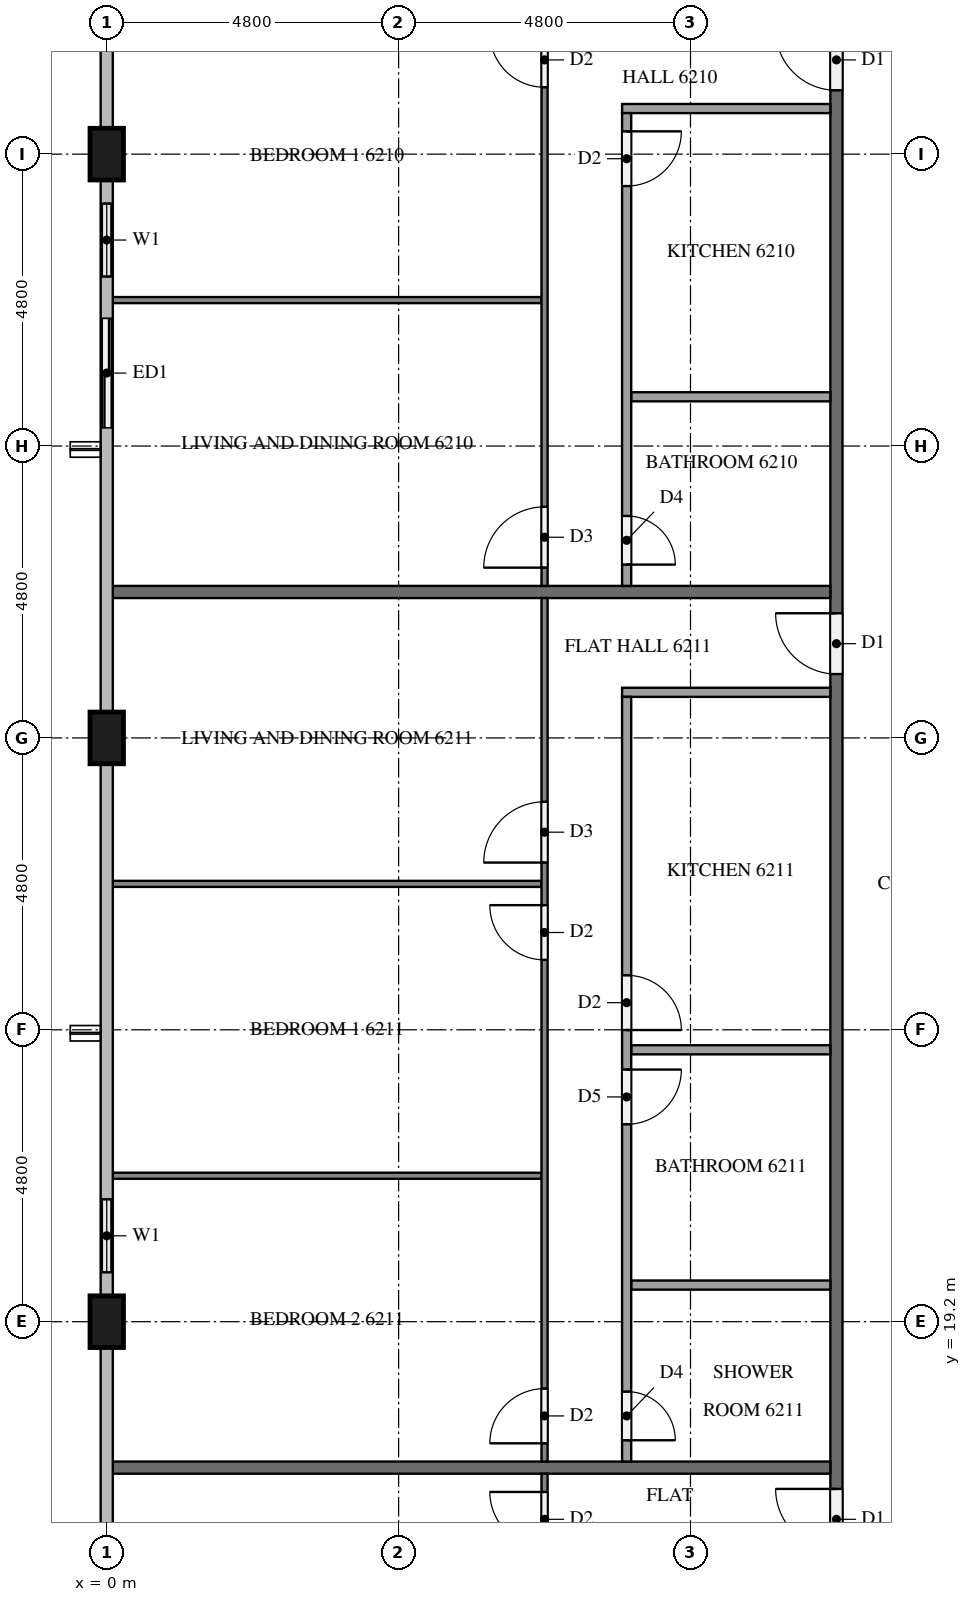
"""IFC4 building model, lengths in metres.
Left out: names, types, materials, properties, quantities, classifications, styles, units other than length and angle.
Written with IfcOpenShell. Run it as: python <this file> out.ifc"""

import sys

from ifc_helpers import new_model, si_unit, direction, frame, frame_2d, origin, origin_2d, place, context, subcontext, project, spatial, rectangle, extrude, element, fill, save


model = new_model("IFC4")
c1 = context("Model", 3, precision=1e-05, world=origin(), true_north=direction((0.0, 1.0)))
c2 = subcontext(c1, "Body", "Model", "MODEL_VIEW")
j1 = project(units=[si_unit("LENGTHUNIT", "METRE"), si_unit("PLANEANGLEUNIT", "RADIAN")], contexts=[c1])
p1 = place(None, origin())
s1 = spatial("IfcSite", under=j1, at=p1, CompositionType="ELEMENT")
p2 = place(p1, origin())
s2 = spatial("IfcBuilding", under=s1, at=p2, CompositionType="ELEMENT")
p3 = place(p2, frame((0.0, 0.0, 238.7)))
s3 = spatial("IfcBuildingStorey", under=s2, at=p3, CompositionType="ELEMENT", Elevation=238.7)
for number, where, z_axis, x_axis in (
    (1, (0.0, 38.4, 0.0), (0.0, 0.0, 1.0), (0.0, 1.0, 0.0)),
    (2, (0.0, 28.8, 0.0), (0.0, 0.0, 1.0), (0.0, 1.0, 0.0)),
    (3, (0.0, 19.2, 0.0), (0.0, 0.0, 1.0), (0.0, 1.0, 0.0)),
):
    element("IfcColumn", number, at=place(p3, frame(where, z_axis=z_axis, x_axis=x_axis)), inside=s3, PredefinedType="COLUMN", context=c2, shape_type="SweptSolid", body=[
        extrude(rectangle(XDim=0.85, YDim=0.55, at=origin_2d()), origin(), (0.0, 0.0, 1.0), 3.2),
    ])
p4 = place(p3, frame((0.0, 37.975, 0.0), z_axis=(0.0, 0.0, 1.0), x_axis=(0.0, -1.0, 0.0)))
e4 = element("IfcWall", 4, at=p4, inside=s3, PredefinedType="SOLIDWALL", context=c2, shape_type="SweptSolid", body=[
    extrude(rectangle(XDim=4.375, YDim=0.15, at=frame_2d((2.188, 0.0))), origin(), (0.0, 0.0, 1.0), 3.2),
])
p5 = place(p4, frame((0.387, 0.0, 0.9)))
e5 = element("IfcOpeningElement", 5, at=p5, cuts=e4, PredefinedType="OPENING", context=c2, shape_type="SweptSolid", body=[
    extrude(rectangle(XDim=1.2, YDim=1.4, at=frame_2d((0.6, 0.7))), frame((0.0, 0.085, 0.0), z_axis=(0.0, -1.0, 0.0), x_axis=(1.0, 0.0, 0.0)), (0.0, 0.0, 1.0), 0.17),
])
p6 = place(p4, frame((2.275, 0.0, 0.0)))
e6 = element("IfcOpeningElement", 6, at=p6, cuts=e4, PredefinedType="OPENING", context=c2, shape_type="SweptSolid", body=[
    extrude(rectangle(XDim=1.8, YDim=2.4, at=frame_2d((0.9, 1.2))), frame((0.0, 0.085, 0.0), z_axis=(0.0, -1.0, 0.0), x_axis=(1.0, 0.0, 0.0)), (0.0, 0.0, 1.0), 0.17),
])
p7 = place(p3, frame((0.0, 21.6, 0.0), z_axis=(0.0, 0.0, 1.0), x_axis=(0.0, -1.0, 0.0)))
e7 = element("IfcWall", 7, at=p7, inside=s3, PredefinedType="SOLIDWALL", context=c2, shape_type="SweptSolid", body=[
    extrude(rectangle(XDim=1.975, YDim=0.15, at=frame_2d((0.988, 0.0))), origin(), (0.0, 0.0, 1.0), 3.2),
])
p8 = place(p7, frame((0.387, 0.0, 0.9)))
e8 = element("IfcOpeningElement", 8, at=p8, cuts=e7, PredefinedType="OPENING", context=c2, shape_type="SweptSolid", body=[
    extrude(rectangle(XDim=1.2, YDim=1.4, at=frame_2d((0.6, 0.7))), frame((0.0, 0.085, 0.0), z_axis=(0.0, -1.0, 0.0), x_axis=(1.0, 0.0, 0.0)), (0.0, 0.0, 1.0), 0.17),
])
p9 = place(p3, frame((12.0, 12.1, 0.0), z_axis=(0.0, 0.0, 1.0), x_axis=(0.0, 1.0, 0.0)))
e9 = element("IfcWall", 9, at=p9, inside=s3, PredefinedType="PARTITIONING", context=c2, shape_type="SweptSolid", body=[
    extrude(rectangle(XDim=28.6, YDim=0.2, at=frame_2d((14.3, 0.0))), origin(), (0.0, 0.0, 1.0), 3.2),
])
p10 = place(p9, frame((27.35, 0.0, 0.0)))
e10 = element("IfcOpeningElement", 10, at=p10, cuts=e9, PredefinedType="OPENING", context=c2, shape_type="SweptSolid", body=[
    extrude(rectangle(XDim=1.0, YDim=2.1, at=frame_2d((0.5, 1.05))), frame((0.0, 0.11, 0.0), z_axis=(0.0, -1.0, 0.0), x_axis=(1.0, 0.0, 0.0)), (0.0, 0.0, 1.0), 0.22),
])
p11 = place(p9, frame((17.75, 0.0, 0.0)))
e11 = element("IfcOpeningElement", 11, at=p11, cuts=e9, PredefinedType="OPENING", context=c2, shape_type="SweptSolid", body=[
    extrude(rectangle(XDim=1.0, YDim=2.1, at=frame_2d((0.5, 1.05))), frame((0.0, 0.11, 0.0), z_axis=(0.0, -1.0, 0.0), x_axis=(1.0, 0.0, 0.0)), (0.0, 0.0, 1.0), 0.22),
])
p12 = place(p9, frame((3.35, 0.0, 0.0)))
e12 = element("IfcOpeningElement", 12, at=p12, cuts=e9, PredefinedType="OPENING", context=c2, shape_type="SweptSolid", body=[
    extrude(rectangle(XDim=1.0, YDim=2.1, at=frame_2d((0.5, 1.05))), frame((0.0, 0.11, 0.0), z_axis=(0.0, -1.0, 0.0), x_axis=(1.0, 0.0, 0.0)), (0.0, 0.0, 1.0), 0.22),
])
for number, where, z_axis, x_axis in (
    (13, (0.1, 31.2, 0.0), (0.0, 0.0, 1.0), (1.0, 0.0, 0.0)),
    (14, (0.1, 16.8, 0.0), (0.0, 0.0, 1.0), (1.0, 0.0, 0.0)),
):
    element("IfcWall", number, at=place(p3, frame(where, z_axis=z_axis, x_axis=x_axis)), inside=s3, PredefinedType="PARTITIONING", context=c2, shape_type="SweptSolid", body=[
        extrude(rectangle(XDim=11.8, YDim=0.2, at=frame_2d((5.9, 0.0))), origin(), (0.0, 0.0, 1.0), 3.2),
    ])
p13 = place(p3, frame((7.15, 36.0, 0.0), z_axis=(0.0, 0.0, 1.0), x_axis=(-1.0, 0.0, 0.0)))
e15 = element("IfcWall", 15, at=p13, inside=s3, PredefinedType="PARTITIONING", context=c2, shape_type="SweptSolid", body=[
    extrude(rectangle(XDim=7.05, YDim=0.1, at=frame_2d((3.525, 0.0))), origin(), (0.0, 0.0, 1.0), 3.2),
])
p14 = place(p3, frame((7.2, 31.3, 0.0), z_axis=(0.0, 0.0, 1.0), x_axis=(0.0, 1.0, 0.0)))
e16 = element("IfcWall", 16, at=p14, inside=s3, PredefinedType="PARTITIONING", context=c2, shape_type="SweptSolid", body=[
    extrude(rectangle(XDim=9.4, YDim=0.1, at=frame_2d((4.7, 0.0))), origin(), (0.0, 0.0, 1.0), 3.2),
])
p15 = place(p14, frame((8.2, 0.0, 0.0)))
e17 = element("IfcOpeningElement", 17, at=p15, cuts=e16, PredefinedType="OPENING", context=c2, shape_type="SweptSolid", body=[
    extrude(rectangle(XDim=0.9, YDim=2.1, at=frame_2d((0.45, 1.05))), frame((0.0, 0.06, 0.0), z_axis=(0.0, -1.0, 0.0), x_axis=(1.0, 0.0, 0.0)), (0.0, 0.0, 1.0), 0.12),
])
p16 = place(p14, frame((0.3, 0.0, 0.0)))
e18 = element("IfcOpeningElement", 18, at=p16, cuts=e16, PredefinedType="OPENING", context=c2, shape_type="SweptSolid", body=[
    extrude(rectangle(XDim=1.0, YDim=2.1, at=frame_2d((0.5, 1.05))), frame((0.0, 0.06, 0.0), z_axis=(0.0, -1.0, 0.0), x_axis=(1.0, 0.0, 0.0)), (0.0, 0.0, 1.0), 0.12),
])
p17 = place(p3, frame((11.9, 34.41, 0.0), z_axis=(0.0, 0.0, 1.0), x_axis=(-1.0, 0.0, 0.0)))
e19 = element("IfcWall", 19, at=p17, inside=s3, PredefinedType="PARTITIONING", context=c2, shape_type="SweptSolid", body=[
    extrude(rectangle(XDim=3.275, YDim=0.15, at=frame_2d((1.637, 0.0))), origin(), (0.0, 0.0, 1.0), 3.2),
])
p18 = place(p3, frame((11.9, 39.15, 0.0), z_axis=(0.0, 0.0, 1.0), x_axis=(-1.0, 0.0, 0.0)))
e20 = element("IfcWall", 20, at=p18, inside=s3, PredefinedType="PARTITIONING", context=c2, shape_type="SweptSolid", body=[
    extrude(rectangle(XDim=3.425, YDim=0.15, at=frame_2d((1.712, 0.0))), origin(), (0.0, 0.0, 1.0), 3.2),
])
p19 = place(p3, frame((8.55, 39.075, 0.0), z_axis=(0.0, 0.0, 1.0), x_axis=(0.0, -1.0, 0.0)))
e21 = element("IfcWall", 21, at=p19, inside=s3, PredefinedType="PARTITIONING", context=c2, shape_type="SweptSolid", body=[
    extrude(rectangle(XDim=7.775, YDim=0.15, at=frame_2d((3.887, 0.0))), origin(), (0.0, 0.0, 1.0), 3.2),
])
p20 = place(p19, frame((0.3, 0.0, 0.0)))
e22 = element("IfcOpeningElement", 22, at=p20, cuts=e21, PredefinedType="OPENING", context=c2, shape_type="SweptSolid", body=[
    extrude(rectangle(XDim=0.9, YDim=2.1, at=frame_2d((0.45, 1.05))), frame((0.0, 0.085, 0.0), z_axis=(0.0, -1.0, 0.0), x_axis=(1.0, 0.0, 0.0)), (0.0, 0.0, 1.0), 0.17),
])
p21 = place(p19, frame((6.625, 0.0, 0.0)))
e23 = element("IfcOpeningElement", 23, at=p21, cuts=e21, PredefinedType="OPENING", context=c2, shape_type="SweptSolid", body=[
    extrude(rectangle(XDim=0.8, YDim=2.1, at=frame_2d((0.4, 1.05))), frame((0.0, 0.085, 0.0), z_axis=(0.0, -1.0, 0.0), x_axis=(1.0, 0.0, 0.0)), (0.0, 0.0, 1.0), 0.17),
])
for number, where, z_axis, x_axis in (
    (24, (7.15, 26.4, 0.0), (0.0, 0.0, 1.0), (-1.0, 0.0, 0.0)),
    (25, (7.15, 21.6, 0.0), (0.0, 0.0, 1.0), (-1.0, 0.0, 0.0)),
):
    element("IfcWall", number, at=place(p3, frame(where, z_axis=z_axis, x_axis=x_axis)), inside=s3, PredefinedType="PARTITIONING", context=c2, shape_type="SweptSolid", body=[
        extrude(rectangle(XDim=7.05, YDim=0.1, at=frame_2d((3.525, 0.0))), origin(), (0.0, 0.0, 1.0), 3.2),
    ])
p22 = place(p3, frame((7.2, 16.9, 0.0), z_axis=(0.0, 0.0, 1.0), x_axis=(0.0, 1.0, 0.0)))
e26 = element("IfcWall", 26, at=p22, inside=s3, PredefinedType="PARTITIONING", context=c2, shape_type="SweptSolid", body=[
    extrude(rectangle(XDim=14.2, YDim=0.1, at=frame_2d((7.1, 0.0))), origin(), (0.0, 0.0, 1.0), 3.2),
])
p23 = place(p22, frame((9.85, 0.0, 0.0)))
e27 = element("IfcOpeningElement", 27, at=p23, cuts=e26, PredefinedType="OPENING", context=c2, shape_type="SweptSolid", body=[
    extrude(rectangle(XDim=1.0, YDim=2.1, at=frame_2d((0.5, 1.05))), frame((0.0, 0.06, 0.0), z_axis=(0.0, -1.0, 0.0), x_axis=(1.0, 0.0, 0.0)), (0.0, 0.0, 1.0), 0.12),
])
p24 = place(p22, frame((8.25, 0.0, 0.0)))
e28 = element("IfcOpeningElement", 28, at=p24, cuts=e26, PredefinedType="OPENING", context=c2, shape_type="SweptSolid", body=[
    extrude(rectangle(XDim=0.9, YDim=2.1, at=frame_2d((0.45, 1.05))), frame((0.0, 0.06, 0.0), z_axis=(0.0, -1.0, 0.0), x_axis=(1.0, 0.0, 0.0)), (0.0, 0.0, 1.0), 0.12),
])
p25 = place(p22, frame((0.3, 0.0, 0.0)))
e29 = element("IfcOpeningElement", 29, at=p25, cuts=e26, PredefinedType="OPENING", context=c2, shape_type="SweptSolid", body=[
    extrude(rectangle(XDim=0.9, YDim=2.1, at=frame_2d((0.45, 1.05))), frame((0.0, 0.06, 0.0), z_axis=(0.0, -1.0, 0.0), x_axis=(1.0, 0.0, 0.0)), (0.0, 0.0, 1.0), 0.12),
])
for number, where, z_axis, x_axis in (
    (30, (11.9, 23.671, 0.0), (0.0, 0.0, 1.0), (-1.0, 0.0, 0.0)),
    (31, (11.9, 19.802, 0.0), (0.0, 0.0, 1.0), (-1.0, 0.0, 0.0)),
):
    element("IfcWall", number, at=place(p3, frame(where, z_axis=z_axis, x_axis=x_axis)), inside=s3, PredefinedType="PARTITIONING", context=c2, shape_type="SweptSolid", body=[
        extrude(rectangle(XDim=3.275, YDim=0.15, at=frame_2d((1.637, 0.0))), origin(), (0.0, 0.0, 1.0), 3.2),
    ])
p26 = place(p3, frame((11.9, 29.55, 0.0), z_axis=(0.0, 0.0, 1.0), x_axis=(-1.0, 0.0, 0.0)))
e32 = element("IfcWall", 32, at=p26, inside=s3, PredefinedType="PARTITIONING", context=c2, shape_type="SweptSolid", body=[
    extrude(rectangle(XDim=3.425, YDim=0.15, at=frame_2d((1.712, 0.0))), origin(), (0.0, 0.0, 1.0), 3.2),
])
p27 = place(p3, frame((8.55, 29.475, 0.0), z_axis=(0.0, 0.0, 1.0), x_axis=(0.0, -1.0, 0.0)))
e33 = element("IfcWall", 33, at=p27, inside=s3, PredefinedType="PARTITIONING", context=c2, shape_type="SweptSolid", body=[
    extrude(rectangle(XDim=12.575, YDim=0.15, at=frame_2d((6.288, 0.0))), origin(), (0.0, 0.0, 1.0), 3.2),
])
p28 = place(p27, frame((4.579, 0.0, 0.0)))
e34 = element("IfcOpeningElement", 34, at=p28, cuts=e33, PredefinedType="OPENING", context=c2, shape_type="SweptSolid", body=[
    extrude(rectangle(XDim=0.9, YDim=2.1, at=frame_2d((0.45, 1.05))), frame((0.0, 0.085, 0.0), z_axis=(0.0, -1.0, 0.0), x_axis=(1.0, 0.0, 0.0)), (0.0, 0.0, 1.0), 0.17),
])
p29 = place(p27, frame((6.129, 0.0, 0.0)))
e35 = element("IfcOpeningElement", 35, at=p29, cuts=e33, PredefinedType="OPENING", context=c2, shape_type="SweptSolid", body=[
    extrude(rectangle(XDim=0.9, YDim=2.1, at=frame_2d((0.45, 1.05))), frame((0.0, 0.085, 0.0), z_axis=(0.0, -1.0, 0.0), x_axis=(1.0, 0.0, 0.0)), (0.0, 0.0, 1.0), 0.17),
])
p30 = place(p27, frame((11.425, 0.0, 0.0)))
e36 = element("IfcOpeningElement", 36, at=p30, cuts=e33, PredefinedType="OPENING", context=c2, shape_type="SweptSolid", body=[
    extrude(rectangle(XDim=0.8, YDim=2.1, at=frame_2d((0.4, 1.05))), frame((0.0, 0.085, 0.0), z_axis=(0.0, -1.0, 0.0), x_axis=(1.0, 0.0, 0.0)), (0.0, 0.0, 1.0), 0.17),
])
p31 = place(p3, frame((7.2, 4.9, 0.0), z_axis=(0.0, 0.0, 1.0), x_axis=(0.0, 1.0, 0.0)))
e37 = element("IfcWall", 37, at=p31, inside=s3, PredefinedType="PARTITIONING", context=c2, shape_type="SweptSolid", body=[
    extrude(rectangle(XDim=11.8, YDim=0.1, at=frame_2d((5.9, 0.0))), origin(), (0.0, 0.0, 1.0), 3.2),
])
p32 = place(p31, frame((10.6, 0.0, 0.0)))
e38 = element("IfcOpeningElement", 38, at=p32, cuts=e37, PredefinedType="OPENING", context=c2, shape_type="SweptSolid", body=[
    extrude(rectangle(XDim=0.9, YDim=2.1, at=frame_2d((0.45, 1.05))), frame((0.0, 0.06, 0.0), z_axis=(0.0, -1.0, 0.0), x_axis=(1.0, 0.0, 0.0)), (0.0, 0.0, 1.0), 0.12),
])
p33 = place(p31, frame((0.3, 0.0, 0.0)))
e39 = element("IfcOpeningElement", 39, at=p33, cuts=e37, PredefinedType="OPENING", context=c2, shape_type="SweptSolid", body=[
    extrude(rectangle(XDim=1.0, YDim=2.1, at=frame_2d((0.5, 1.05))), frame((0.0, 0.06, 0.0), z_axis=(0.0, -1.0, 0.0), x_axis=(1.0, 0.0, 0.0)), (0.0, 0.0, 1.0), 0.12),
])
p34 = place(p5, origin())
e40 = element("IfcWindow", 40, at=p34, inside=s3, PartitioningType="SINGLE_PANEL", PredefinedType="WINDOW", context=c2, shape_type="SweptSolid", body=[
    extrude(rectangle(XDim=1.2, YDim=1.4, at=frame_2d((0.6, 0.7))), frame((0.0, 0.03, 0.0), z_axis=(0.0, -1.0, 0.0), x_axis=(1.0, 0.0, 0.0)), (0.0, 0.0, 1.0), 0.06),
])
fill(e5, e40)
p35 = place(p6, origin())
e41 = element("IfcDoor", 41, at=p35, inside=s3, OperationType="SLIDING_TO_LEFT", PredefinedType="DOOR", context=c2, shape_type="SweptSolid", body=[
    extrude(rectangle(XDim=1.8, YDim=2.4, at=frame_2d((0.9, 1.2))), frame((0.0, 0.025, 0.0), z_axis=(0.0, -1.0, 0.0), x_axis=(1.0, 0.0, 0.0)), (0.0, 0.0, 1.0), 0.05),
])
fill(e6, e41)
p36 = place(p8, origin())
e42 = element("IfcWindow", 42, at=p36, inside=s3, PartitioningType="SINGLE_PANEL", PredefinedType="WINDOW", context=c2, shape_type="SweptSolid", body=[
    extrude(rectangle(XDim=1.2, YDim=1.4, at=frame_2d((0.6, 0.7))), frame((0.0, 0.03, 0.0), z_axis=(0.0, -1.0, 0.0), x_axis=(1.0, 0.0, 0.0)), (0.0, 0.0, 1.0), 0.06),
])
fill(e8, e42)
p37 = place(p10, origin())
e43 = element("IfcDoor", 43, at=p37, inside=s3, OperationType="SINGLE_SWING_RIGHT", PredefinedType="DOOR", context=c2, shape_type="SweptSolid", body=[
    extrude(rectangle(XDim=1.0, YDim=2.1, at=frame_2d((0.5, 1.05))), frame((0.0, 0.025, 0.0), z_axis=(0.0, -1.0, 0.0), x_axis=(1.0, 0.0, 0.0)), (0.0, 0.0, 1.0), 0.05),
])
fill(e10, e43)
p38 = place(p11, origin())
e44 = element("IfcDoor", 44, at=p38, inside=s3, OperationType="SINGLE_SWING_RIGHT", PredefinedType="DOOR", context=c2, shape_type="SweptSolid", body=[
    extrude(rectangle(XDim=1.0, YDim=2.1, at=frame_2d((0.5, 1.05))), frame((0.0, 0.025, 0.0), z_axis=(0.0, -1.0, 0.0), x_axis=(1.0, 0.0, 0.0)), (0.0, 0.0, 1.0), 0.05),
])
fill(e11, e44)
p39 = place(p12, origin())
e45 = element("IfcDoor", 45, at=p39, inside=s3, OperationType="SINGLE_SWING_RIGHT", PredefinedType="DOOR", context=c2, shape_type="SweptSolid", body=[
    extrude(rectangle(XDim=1.0, YDim=2.1, at=frame_2d((0.5, 1.05))), frame((0.0, 0.025, 0.0), z_axis=(0.0, -1.0, 0.0), x_axis=(1.0, 0.0, 0.0)), (0.0, 0.0, 1.0), 0.05),
])
fill(e12, e45)
p40 = place(p15, origin())
e46 = element("IfcDoor", 46, at=p40, inside=s3, OperationType="SINGLE_SWING_RIGHT", PredefinedType="DOOR", context=c2, shape_type="SweptSolid", body=[
    extrude(rectangle(XDim=0.9, YDim=2.1, at=frame_2d((0.45, 1.05))), frame((0.0, 0.025, 0.0), z_axis=(0.0, -1.0, 0.0), x_axis=(1.0, 0.0, 0.0)), (0.0, 0.0, 1.0), 0.05),
])
fill(e17, e46)
p41 = place(p16, origin())
e47 = element("IfcDoor", 47, at=p41, inside=s3, OperationType="SINGLE_SWING_LEFT", PredefinedType="DOOR", context=c2, shape_type="SweptSolid", body=[
    extrude(rectangle(XDim=1.0, YDim=2.1, at=frame_2d((0.5, 1.05))), frame((0.0, 0.025, 0.0), z_axis=(0.0, -1.0, 0.0), x_axis=(1.0, 0.0, 0.0)), (0.0, 0.0, 1.0), 0.05),
])
fill(e18, e47)
p42 = place(p20, origin())
e48 = element("IfcDoor", 48, at=p42, inside=s3, OperationType="SINGLE_SWING_LEFT", PredefinedType="DOOR", context=c2, shape_type="SweptSolid", body=[
    extrude(rectangle(XDim=0.9, YDim=2.1, at=frame_2d((0.45, 1.05))), frame((0.0, 0.025, 0.0), z_axis=(0.0, -1.0, 0.0), x_axis=(1.0, 0.0, 0.0)), (0.0, 0.0, 1.0), 0.05),
])
fill(e22, e48)
p43 = place(p21, origin())
e49 = element("IfcDoor", 49, at=p43, inside=s3, OperationType="SINGLE_SWING_RIGHT", PredefinedType="DOOR", context=c2, shape_type="SweptSolid", body=[
    extrude(rectangle(XDim=0.8, YDim=2.1, at=frame_2d((0.4, 1.05))), frame((0.0, 0.025, 0.0), z_axis=(0.0, -1.0, 0.0), x_axis=(1.0, 0.0, 0.0)), (0.0, 0.0, 1.0), 0.05),
])
fill(e23, e49)
p44 = place(p23, origin())
e50 = element("IfcDoor", 50, at=p44, inside=s3, OperationType="SINGLE_SWING_LEFT", PredefinedType="DOOR", context=c2, shape_type="SweptSolid", body=[
    extrude(rectangle(XDim=1.0, YDim=2.1, at=frame_2d((0.5, 1.05))), frame((0.0, 0.025, 0.0), z_axis=(0.0, -1.0, 0.0), x_axis=(1.0, 0.0, 0.0)), (0.0, 0.0, 1.0), 0.05),
])
fill(e27, e50)
p45 = place(p24, origin())
e51 = element("IfcDoor", 51, at=p45, inside=s3, OperationType="SINGLE_SWING_RIGHT", PredefinedType="DOOR", context=c2, shape_type="SweptSolid", body=[
    extrude(rectangle(XDim=0.9, YDim=2.1, at=frame_2d((0.45, 1.05))), frame((0.0, 0.025, 0.0), z_axis=(0.0, -1.0, 0.0), x_axis=(1.0, 0.0, 0.0)), (0.0, 0.0, 1.0), 0.05),
])
fill(e28, e51)
p46 = place(p25, origin())
e52 = element("IfcDoor", 52, at=p46, inside=s3, OperationType="SINGLE_SWING_LEFT", PredefinedType="DOOR", context=c2, shape_type="SweptSolid", body=[
    extrude(rectangle(XDim=0.9, YDim=2.1, at=frame_2d((0.45, 1.05))), frame((0.0, 0.025, 0.0), z_axis=(0.0, -1.0, 0.0), x_axis=(1.0, 0.0, 0.0)), (0.0, 0.0, 1.0), 0.05),
])
fill(e29, e52)
p47 = place(p28, origin())
e53 = element("IfcDoor", 53, at=p47, inside=s3, OperationType="SINGLE_SWING_RIGHT", PredefinedType="DOOR", context=c2, shape_type="SweptSolid", body=[
    extrude(rectangle(XDim=0.9, YDim=2.1, at=frame_2d((0.45, 1.05))), frame((0.0, 0.025, 0.0), z_axis=(0.0, -1.0, 0.0), x_axis=(1.0, 0.0, 0.0)), (0.0, 0.0, 1.0), 0.05),
])
fill(e34, e53)
p48 = place(p29, origin())
e54 = element("IfcDoor", 54, at=p48, inside=s3, OperationType="SINGLE_SWING_LEFT", PredefinedType="DOOR", context=c2, shape_type="SweptSolid", body=[
    extrude(rectangle(XDim=0.9, YDim=2.1, at=frame_2d((0.45, 1.05))), frame((0.0, 0.025, 0.0), z_axis=(0.0, -1.0, 0.0), x_axis=(1.0, 0.0, 0.0)), (0.0, 0.0, 1.0), 0.05),
])
fill(e35, e54)
p49 = place(p30, origin())
e55 = element("IfcDoor", 55, at=p49, inside=s3, OperationType="SINGLE_SWING_RIGHT", PredefinedType="DOOR", context=c2, shape_type="SweptSolid", body=[
    extrude(rectangle(XDim=0.8, YDim=2.1, at=frame_2d((0.4, 1.05))), frame((0.0, 0.025, 0.0), z_axis=(0.0, -1.0, 0.0), x_axis=(1.0, 0.0, 0.0)), (0.0, 0.0, 1.0), 0.05),
])
fill(e36, e55)
p50 = place(p32, origin())
e56 = element("IfcDoor", 56, at=p50, inside=s3, OperationType="SINGLE_SWING_RIGHT", PredefinedType="DOOR", context=c2, shape_type="SweptSolid", body=[
    extrude(rectangle(XDim=0.9, YDim=2.1, at=frame_2d((0.45, 1.05))), frame((0.0, 0.025, 0.0), z_axis=(0.0, -1.0, 0.0), x_axis=(1.0, 0.0, 0.0)), (0.0, 0.0, 1.0), 0.05),
])
fill(e38, e56)
save(model, sys.argv[1])
